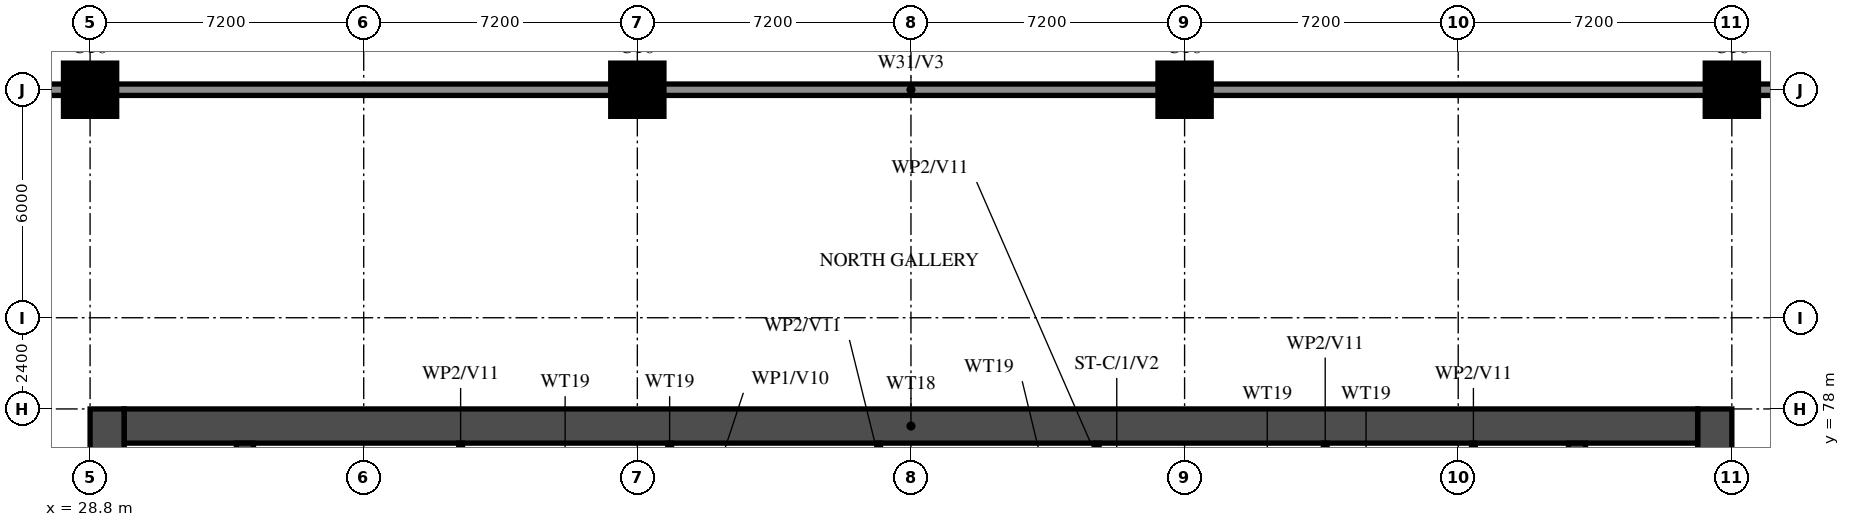
"""IFC4 building model, lengths in metres.
Left out: names, types, materials, properties, quantities, classifications, styles, units other than length and angle.
Written with IfcOpenShell. Run it as: python <this file> out.ifc"""

import sys

from ifc_helpers import new_model, si_unit, direction, frame, frame_2d, origin, origin_2d, place, context, subcontext, project, spatial, rectangle, circle, extrude, source, transform, mapped, element, save


model = new_model("IFC4")
c1 = context("Model", 3, precision=1e-05, world=origin(), true_north=direction((0.0, 1.0)))
c2 = subcontext(c1, "Body", "Model", "MODEL_VIEW")
j1 = project(units=[si_unit("LENGTHUNIT", "METRE"), si_unit("PLANEANGLEUNIT", "RADIAN")], contexts=[c1])
p1 = place(None, origin())
s1 = spatial("IfcSite", under=j1, at=p1, CompositionType="ELEMENT")
p2 = place(p1, origin())
s2 = spatial("IfcBuilding", under=s1, at=p2, CompositionType="ELEMENT")
p3 = place(p2, frame((0.0, 0.0, 21.6)))
s3 = spatial("IfcBuildingStorey", under=s2, at=p3, CompositionType="ELEMENT", Elevation=21.6)
m1 = source(origin(), c2, "Body", "SweptSolid", [
    extrude(circle(Radius=0.7, at=origin_2d()), origin(), (0.0, 0.0, 1.0), 4.95),
])
for number, where, z_axis, x_axis in (
    (1, (28.8, 86.4, 0.0), (0.0, 0.0, 1.0), (1.0, 0.0, 0.0)),
    (2, (43.2, 86.4, 0.0), (0.0, 0.0, 1.0), (1.0, 0.0, 0.0)),
    (3, (57.6, 86.4, 0.0), (0.0, 0.0, 1.0), (1.0, 0.0, 0.0)),
    (4, (72.0, 86.4, 0.0), (0.0, 0.0, 1.0), (1.0, 0.0, 0.0)),
):
    element("IfcColumn", number, at=place(p3, frame(where, z_axis=z_axis, x_axis=x_axis)), inside=s3, PredefinedType="COLUMN", context=c2, shape_type="MappedRepresentation", body=[
        mapped(m1, transform((0.0, 0.0, 0.0))),
    ])
for number, where, z_axis, x_axis in (
    (5, (29.25, 66.0, 0.0), (0.0, 0.0, 1.0), (0.0, 1.0, 0.0)),
    (6, (71.55, 66.0, 0.0), (0.0, 0.0, 1.0), (0.0, 1.0, 0.0)),
):
    element("IfcWall", number, at=place(p3, frame(where, z_axis=z_axis, x_axis=x_axis)), inside=s3, PredefinedType="SHEAR", context=c2, shape_type="SweptSolid", body=[
        extrude(rectangle(XDim=12.0, YDim=0.9, at=frame_2d((6.0, 0.0))), origin(), (0.0, 0.0, 1.0), 4.95),
    ])
p4 = place(p3, frame((29.7, 77.55, 0.0), z_axis=(0.0, 0.0, 1.0), x_axis=(1.0, 0.0, 0.0)))
e7 = element("IfcWall", 7, at=p4, inside=s3, PredefinedType="SHEAR", context=c2, shape_type="SweptSolid", body=[
    extrude(rectangle(XDim=41.4, YDim=0.9, at=frame_2d((20.7, 0.0))), origin(), (0.0, 0.0, 1.0), 4.95),
])
p5 = place(p3, frame((32.875, 66.45, 0.0), z_axis=(0.0, 0.0, 1.0), x_axis=(0.0, 1.0, 0.0)))
e8 = element("IfcWall", 8, at=p5, inside=s3, PredefinedType="SHEAR", context=c2, shape_type="SweptSolid", body=[
    extrude(rectangle(XDim=10.65, YDim=0.45, at=frame_2d((5.325, 0.0))), origin(), (0.0, 0.0, 1.0), 4.95),
])
p6 = place(p3, frame((67.925, 66.45, 0.0), z_axis=(0.0, 0.0, 1.0), x_axis=(0.0, 1.0, 0.0)))
e9 = element("IfcWall", 9, at=p6, inside=s3, PredefinedType="SHEAR", context=c2, shape_type="SweptSolid", body=[
    extrude(rectangle(XDim=10.65, YDim=0.45, at=frame_2d((5.325, 0.0))), origin(), (0.0, 0.0, 1.0), 4.95),
])
p7 = place(p6, frame((0.15, 0.0, 0.0)))
e10 = element("IfcOpeningElement", 10, at=p7, cuts=e9, PredefinedType="OPENING", context=c2, shape_type="SweptSolid", body=[
    extrude(rectangle(XDim=1.1, YDim=2.1, at=frame_2d((0.55, 1.05))), frame((0.0, 0.235, 0.0), z_axis=(0.0, -1.0, 0.0), x_axis=(1.0, 0.0, 0.0)), (0.0, 0.0, 1.0), 0.47),
])
for number, where, z_axis, x_axis in (
    (11, (38.55, 76.325, 0.0), (0.0, 0.0, 1.0), (0.0, 1.0, 0.0)),
    (12, (44.05, 76.325, 0.0), (0.0, 0.0, 1.0), (0.0, 1.0, 0.0)),
    (13, (49.55, 76.325, 0.0), (0.0, 0.0, 1.0), (0.0, 1.0, 0.0)),
    (14, (55.3, 76.325, 0.0), (0.0, 0.0, 1.0), (0.0, 1.0, 0.0)),
    (15, (61.3, 76.325, 0.0), (0.0, 0.0, 1.0), (0.0, 1.0, 0.0)),
    (16, (65.2, 76.325, 0.0), (0.0, 0.0, 1.0), (0.0, 1.0, 0.0)),
):
    element("IfcWall", number, at=place(p3, frame(where, z_axis=z_axis, x_axis=x_axis)), inside=s3, PredefinedType="PARTITIONING", context=c2, shape_type="SweptSolid", body=[
        extrude(rectangle(XDim=0.775, YDim=0.1, at=frame_2d((0.388, 0.0))), origin(), (0.0, 0.0, 1.0), 4.95),
    ])
p8 = place(p3, frame((0.0, 86.4, 0.0), z_axis=(0.0, 0.0, 1.0), x_axis=(1.0, 0.0, 0.0)))
e17 = element("IfcWall", 17, at=p8, inside=s3, PredefinedType="SOLIDWALL", context=c2, shape_type="SweptSolid", body=[
    extrude(rectangle(XDim=100.8, YDim=0.3, at=frame_2d((50.4, 0.0))), origin(), (0.0, 0.0, 1.0), 4.95),
])
p9 = place(p8, frame((2.4, 0.0, 0.6)))
e18 = element("IfcOpeningElement", 18, at=p9, cuts=e17, PredefinedType="OPENING", context=c2, shape_type="SweptSolid", body=[
    extrude(rectangle(XDim=1.8, YDim=2.4, at=frame_2d((0.9, 1.2))), frame((0.0, 0.16, 0.0), z_axis=(0.0, -1.0, 0.0), x_axis=(1.0, 0.0, 0.0)), (0.0, 0.0, 1.0), 0.32),
])
p10 = place(p8, frame((6.0, 0.0, 0.6)))
e19 = element("IfcOpeningElement", 19, at=p10, cuts=e17, PredefinedType="OPENING", context=c2, shape_type="SweptSolid", body=[
    extrude(rectangle(XDim=1.8, YDim=2.4, at=frame_2d((0.9, 1.2))), frame((0.0, 0.16, 0.0), z_axis=(0.0, -1.0, 0.0), x_axis=(1.0, 0.0, 0.0)), (0.0, 0.0, 1.0), 0.32),
])
p11 = place(p8, frame((9.6, 0.0, 0.6)))
e20 = element("IfcOpeningElement", 20, at=p11, cuts=e17, PredefinedType="OPENING", context=c2, shape_type="SweptSolid", body=[
    extrude(rectangle(XDim=1.8, YDim=2.4, at=frame_2d((0.9, 1.2))), frame((0.0, 0.16, 0.0), z_axis=(0.0, -1.0, 0.0), x_axis=(1.0, 0.0, 0.0)), (0.0, 0.0, 1.0), 0.32),
])
p12 = place(p8, frame((16.8, 0.0, 0.6)))
e21 = element("IfcOpeningElement", 21, at=p12, cuts=e17, PredefinedType="OPENING", context=c2, shape_type="SweptSolid", body=[
    extrude(rectangle(XDim=1.8, YDim=2.4, at=frame_2d((0.9, 1.2))), frame((0.0, 0.16, 0.0), z_axis=(0.0, -1.0, 0.0), x_axis=(1.0, 0.0, 0.0)), (0.0, 0.0, 1.0), 0.32),
])
p13 = place(p8, frame((20.4, 0.0, 0.6)))
e22 = element("IfcOpeningElement", 22, at=p13, cuts=e17, PredefinedType="OPENING", context=c2, shape_type="SweptSolid", body=[
    extrude(rectangle(XDim=1.8, YDim=2.4, at=frame_2d((0.9, 1.2))), frame((0.0, 0.16, 0.0), z_axis=(0.0, -1.0, 0.0), x_axis=(1.0, 0.0, 0.0)), (0.0, 0.0, 1.0), 0.32),
])
p14 = place(p8, frame((78.0, 0.0, 0.6)))
e23 = element("IfcOpeningElement", 23, at=p14, cuts=e17, PredefinedType="OPENING", context=c2, shape_type="SweptSolid", body=[
    extrude(rectangle(XDim=1.8, YDim=2.4, at=frame_2d((0.9, 1.2))), frame((0.0, 0.16, 0.0), z_axis=(0.0, -1.0, 0.0), x_axis=(1.0, 0.0, 0.0)), (0.0, 0.0, 1.0), 0.32),
])
p15 = place(p8, frame((81.6, 0.0, 0.6)))
e24 = element("IfcOpeningElement", 24, at=p15, cuts=e17, PredefinedType="OPENING", context=c2, shape_type="SweptSolid", body=[
    extrude(rectangle(XDim=1.8, YDim=2.4, at=frame_2d((0.9, 1.2))), frame((0.0, 0.16, 0.0), z_axis=(0.0, -1.0, 0.0), x_axis=(1.0, 0.0, 0.0)), (0.0, 0.0, 1.0), 0.32),
])
p16 = place(p8, frame((88.8, 0.0, 0.6)))
e25 = element("IfcOpeningElement", 25, at=p16, cuts=e17, PredefinedType="OPENING", context=c2, shape_type="SweptSolid", body=[
    extrude(rectangle(XDim=1.8, YDim=2.4, at=frame_2d((0.9, 1.2))), frame((0.0, 0.16, 0.0), z_axis=(0.0, -1.0, 0.0), x_axis=(1.0, 0.0, 0.0)), (0.0, 0.0, 1.0), 0.32),
])
p17 = place(p8, frame((92.4, 0.0, 0.6)))
e26 = element("IfcOpeningElement", 26, at=p17, cuts=e17, PredefinedType="OPENING", context=c2, shape_type="SweptSolid", body=[
    extrude(rectangle(XDim=1.8, YDim=2.4, at=frame_2d((0.9, 1.2))), frame((0.0, 0.16, 0.0), z_axis=(0.0, -1.0, 0.0), x_axis=(1.0, 0.0, 0.0)), (0.0, 0.0, 1.0), 0.32),
])
p18 = place(p8, frame((96.0, 0.0, 0.6)))
e27 = element("IfcOpeningElement", 27, at=p18, cuts=e17, PredefinedType="OPENING", context=c2, shape_type="SweptSolid", body=[
    extrude(rectangle(XDim=1.8, YDim=2.4, at=frame_2d((0.9, 1.2))), frame((0.0, 0.16, 0.0), z_axis=(0.0, -1.0, 0.0), x_axis=(1.0, 0.0, 0.0)), (0.0, 0.0, 1.0), 0.32),
])
save(model, sys.argv[1])
